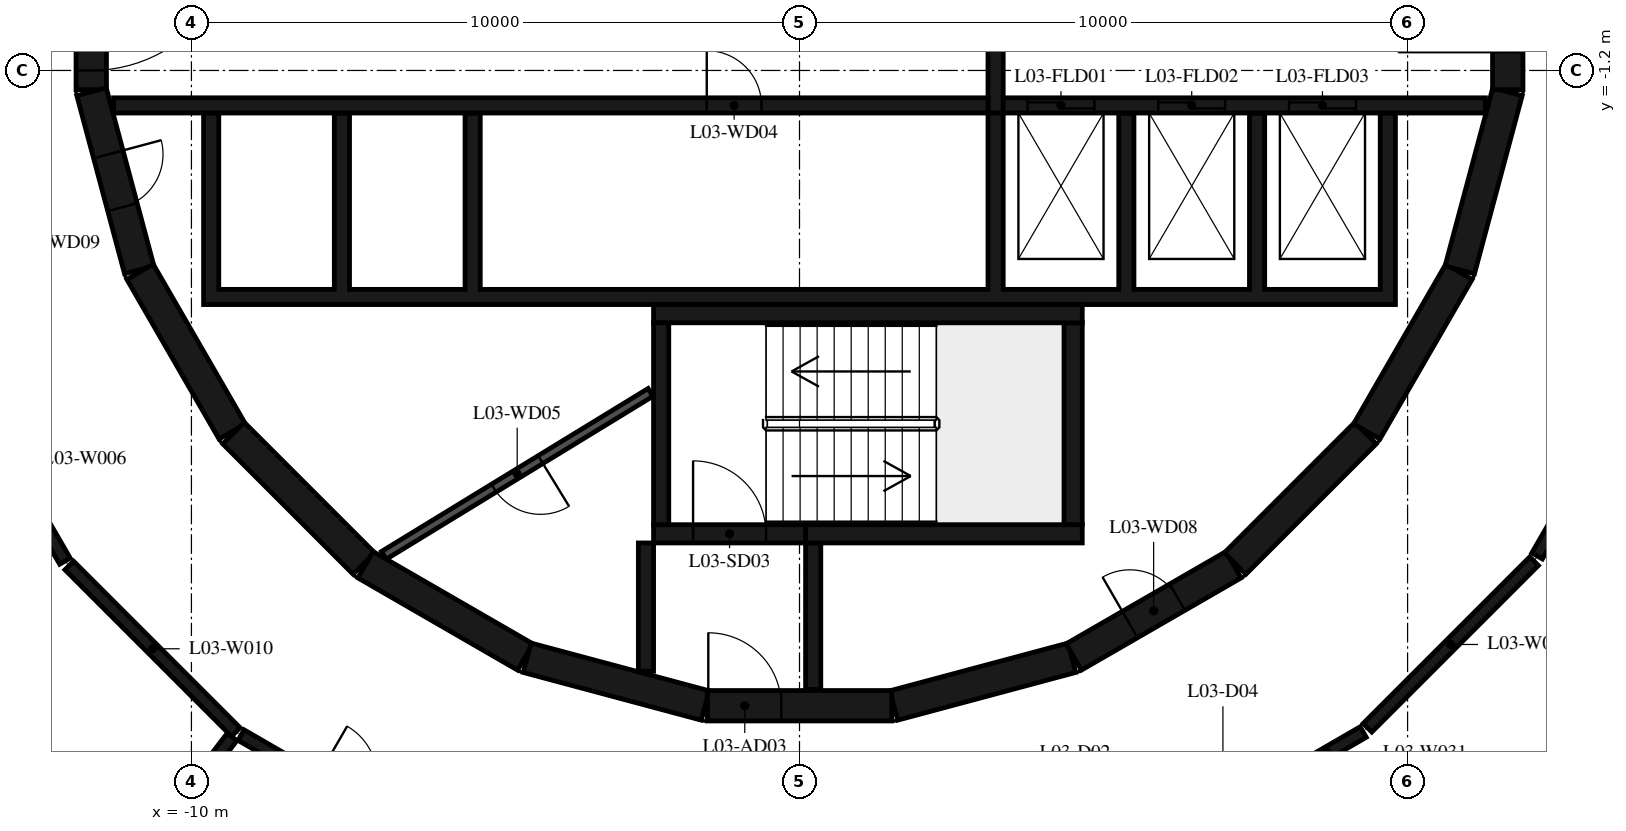
"""IFC4 building model, lengths in metres.
Left out: names, types, materials, properties, quantities, classifications, styles, units other than length and angle.
Written with IfcOpenShell. Run it as: python <this file> out.ifc"""

import sys

from ifc_helpers import new_model, si_unit, direction, frame, frame_2d, origin, place, context, subcontext, project, spatial, polyline, rectangle, outline, extrude, element, fill, save


model = new_model("IFC4")
c1 = context("Model", 3, precision=1e-05, world=origin(), true_north=direction((0.0, 1.0)))
c2 = subcontext(c1, "Body", "Model", "MODEL_VIEW")
j1 = project(units=[si_unit("LENGTHUNIT", "METRE"), si_unit("PLANEANGLEUNIT", "RADIAN")], contexts=[c1])
p1 = place(None, origin())
s1 = spatial("IfcSite", under=j1, at=p1, CompositionType="ELEMENT")
p2 = place(p1, origin())
s2 = spatial("IfcBuilding", under=s1, at=p2, CompositionType="ELEMENT")
p3 = place(p2, frame((0.0, 0.0, 18.6)))
s3 = spatial("IfcBuildingStorey", under=s2, at=p3, CompositionType="ELEMENT", Elevation=18.6)
p4 = place(p3, frame((1.55, -11.643, 0.0), z_axis=(0.0, 0.0, 1.0), x_axis=(0.965948410781, 0.258734743916, 0.0)))
e1 = element("IfcWall", 1, at=p4, inside=s3, PredefinedType="SHEAR", context=c2, shape_type="SweptSolid", body=[
    extrude(rectangle(XDim=3.033, YDim=0.5, at=frame_2d((1.516, 0.0))), origin(), (0.0, 0.0, 1.0), 4.42),
])
p5 = place(p3, frame((4.51, -10.845, 0.0), z_axis=(0.0, 0.0, 1.0), x_axis=(0.865975092491, 0.500087131594, 0.0)))
e2 = element("IfcWall", 2, at=p5, inside=s3, PredefinedType="SHEAR", context=c2, shape_type="SweptSolid", body=[
    extrude(rectangle(XDim=3.033, YDim=0.5, at=frame_2d((1.516, 0.0))), origin(), (0.0, 0.0, 1.0), 4.42),
])
p6 = place(p5, frame((1.066, 0.0, 0.0)))
e3 = element("IfcOpeningElement", 3, at=p6, cuts=e2, PredefinedType="OPENING", context=c2, shape_type="SweptSolid", body=[
    extrude(rectangle(XDim=0.9, YDim=2.1, at=frame_2d((0.45, 1.05))), frame((0.0, 0.26, 0.0), z_axis=(0.0, -1.0, 0.0), x_axis=(1.0, 0.0, 0.0)), (0.0, 0.0, 1.0), 0.52),
])
p7 = place(p3, frame((7.164, -9.308, 0.0), z_axis=(0.0, 0.0, 1.0), x_axis=(0.707106781187, 0.707106781187, 0.0)))
e4 = element("IfcWall", 4, at=p7, inside=s3, PredefinedType="SHEAR", context=c2, shape_type="SweptSolid", body=[
    extrude(rectangle(XDim=3.032, YDim=0.5, at=frame_2d((1.516, 0.0))), origin(), (0.0, 0.0, 1.0), 4.42),
])
for number, where, z_axis, x_axis in (
    (5, (9.329, -7.137, 0.0), (0.0, 0.0, 1.0), (0.5, 0.866, 0.0)),
    (6, (10.858, -4.479, 0.0), (0.0, 0.0, 1.0), (0.259, 0.966, 0.0)),
):
    element("IfcWall", number, at=place(p3, frame(where, z_axis=z_axis, x_axis=x_axis)), inside=s3, PredefinedType="SHEAR", context=c2, shape_type="SweptSolid", body=[
        extrude(rectangle(XDim=3.033, YDim=0.5, at=frame_2d((1.516, 0.0))), origin(), (0.0, 0.0, 1.0), 4.42),
    ])
p8 = place(p3, frame((11.647, -1.516, 0.0), z_axis=(0.0, 0.0, 1.0), x_axis=(0.0, 1.0, 0.0)))
e7 = element("IfcWall", 7, at=p8, inside=s3, PredefinedType="SHEAR", context=c2, shape_type="SweptSolid", body=[
    extrude(rectangle(XDim=3.033, YDim=0.5, at=frame_2d((1.516, 0.0))), origin(), (0.0, 0.0, 1.0), 4.42),
])
p9 = place(p8, frame((0.616, 0.0, 0.0)))
e8 = element("IfcOpeningElement", 8, at=p9, cuts=e7, PredefinedType="OPENING", context=c2, shape_type="SweptSolid", body=[
    extrude(rectangle(XDim=1.8, YDim=2.1, at=frame_2d((0.9, 1.05))), frame((0.0, 0.26, 0.0), z_axis=(0.0, -1.0, 0.0), x_axis=(1.0, 0.0, 0.0)), (0.0, 0.0, 1.0), 0.52),
])
p10 = place(p3, frame((-11.647, 1.516, 0.0), z_axis=(0.0, 0.0, 1.0), x_axis=(0.0, -1.0, 0.0)))
e9 = element("IfcWall", 9, at=p10, inside=s3, PredefinedType="SHEAR", context=c2, shape_type="SweptSolid", body=[
    extrude(rectangle(XDim=3.033, YDim=0.5, at=frame_2d((1.516, 0.0))), origin(), (0.0, 0.0, 1.0), 4.42),
])
p11 = place(p10, frame((0.316, 0.0, 0.0)))
e10 = element("IfcOpeningElement", 10, at=p11, cuts=e9, PredefinedType="OPENING", context=c2, shape_type="SweptSolid", body=[
    extrude(rectangle(XDim=2.4, YDim=2.1, at=frame_2d((1.2, 1.05))), frame((0.0, 0.26, 0.0), z_axis=(0.0, -1.0, 0.0), x_axis=(1.0, 0.0, 0.0)), (0.0, 0.0, 1.0), 0.52),
])
p12 = place(p3, frame((-11.643, -1.55, 0.0), z_axis=(0.0, 0.0, 1.0), x_axis=(0.258734743916, -0.965948410781, 0.0)))
e11 = element("IfcWall", 11, at=p12, inside=s3, PredefinedType="SHEAR", context=c2, shape_type="SweptSolid", body=[
    extrude(rectangle(XDim=3.033, YDim=0.5, at=frame_2d((1.516, 0.0))), origin(), (0.0, 0.0, 1.0), 4.42),
])
p13 = place(p12, frame((1.066, 0.0, 0.0)))
e12 = element("IfcOpeningElement", 12, at=p13, cuts=e11, PredefinedType="OPENING", context=c2, shape_type="SweptSolid", body=[
    extrude(rectangle(XDim=0.9, YDim=2.1, at=frame_2d((0.45, 1.05))), frame((0.0, 0.26, 0.0), z_axis=(0.0, -1.0, 0.0), x_axis=(1.0, 0.0, 0.0)), (0.0, 0.0, 1.0), 0.52),
])
p14 = place(p3, frame((-10.845, -4.51, 0.0), z_axis=(0.0, 0.0, 1.0), x_axis=(0.500087131594, -0.865975092491, 0.0)))
e13 = element("IfcWall", 13, at=p14, inside=s3, PredefinedType="SHEAR", context=c2, shape_type="SweptSolid", body=[
    extrude(rectangle(XDim=3.033, YDim=0.5, at=frame_2d((1.516, 0.0))), origin(), (0.0, 0.0, 1.0), 4.42),
])
p15 = place(p3, frame((-9.308, -7.164, 0.0), z_axis=(0.0, 0.0, 1.0), x_axis=(0.707106781187, -0.707106781187, 0.0)))
e14 = element("IfcWall", 14, at=p15, inside=s3, PredefinedType="SHEAR", context=c2, shape_type="SweptSolid", body=[
    extrude(rectangle(XDim=3.032, YDim=0.5, at=frame_2d((1.516, 0.0))), origin(), (0.0, 0.0, 1.0), 4.42),
])
for number, where, z_axis, x_axis in (
    (15, (-7.137, -9.329, 0.0), (0.0, 0.0, 1.0), (0.866, -0.5, 0.0)),
    (16, (-4.479, -10.858, 0.0), (0.0, 0.0, 1.0), (0.966, -0.259, 0.0)),
):
    element("IfcWall", number, at=place(p3, frame(where, z_axis=z_axis, x_axis=x_axis)), inside=s3, PredefinedType="SHEAR", context=c2, shape_type="SweptSolid", body=[
        extrude(rectangle(XDim=3.033, YDim=0.5, at=frame_2d((1.516, 0.0))), origin(), (0.0, 0.0, 1.0), 4.42),
    ])
p16 = place(p3, frame((-1.516, -11.647, 0.0), z_axis=(0.0, 0.0, 1.0), x_axis=(1.0, 0.0, 0.0)))
e17 = element("IfcWall", 17, at=p16, inside=s3, PredefinedType="SHEAR", context=c2, shape_type="SweptSolid", body=[
    extrude(rectangle(XDim=3.033, YDim=0.5, at=frame_2d((1.516, 0.0))), origin(), (0.0, 0.0, 1.0), 4.42),
])
p17 = place(p16, frame((0.016, 0.0, 0.0)))
e18 = element("IfcOpeningElement", 18, at=p17, cuts=e17, PredefinedType="OPENING", context=c2, shape_type="SweptSolid", body=[
    extrude(rectangle(XDim=1.2, YDim=2.1, at=frame_2d((0.6, 1.05))), frame((0.0, 0.26, 0.0), z_axis=(0.0, -1.0, 0.0), x_axis=(1.0, 0.0, 0.0)), (0.0, 0.0, 1.0), 0.52),
])
p18 = place(p3, frame((-2.275, -8.67, 0.0), z_axis=(0.0, 0.0, 1.0), x_axis=(0.0, 1.0, 0.0)))
e19 = element("IfcWall", 19, at=p18, inside=s3, PredefinedType="SHEAR", context=c2, shape_type="SweptSolid", body=[
    extrude(rectangle(XDim=3.32, YDim=0.25, at=frame_2d((1.66, 0.0))), origin(), (0.0, 0.0, 1.0), 4.42),
])
p19 = place(p3, frame((-2.4, -5.2, 0.0), z_axis=(0.0, 0.0, 1.0), x_axis=(1.0, 0.0, 0.0)))
e20 = element("IfcWall", 20, at=p19, inside=s3, PredefinedType="SHEAR", context=c2, shape_type="SweptSolid", body=[
    extrude(rectangle(XDim=7.05, YDim=0.3, at=frame_2d((3.525, 0.0))), origin(), (0.0, 0.0, 1.0), 4.42),
])
p20 = place(p3, frame((4.5, -8.67, 0.0), z_axis=(0.0, 0.0, 1.0), x_axis=(0.0, 1.0, 0.0)))
e21 = element("IfcWall", 21, at=p20, inside=s3, PredefinedType="SHEAR", context=c2, shape_type="SweptSolid", body=[
    extrude(rectangle(XDim=3.32, YDim=0.3, at=frame_2d((1.66, 0.0))), origin(), (0.0, 0.0, 1.0), 4.42),
])
p21 = place(p3, frame((0.1, -8.82, 0.0), z_axis=(0.0, 0.0, 1.0), x_axis=(1.0, 0.0, 0.0)))
e22 = element("IfcWall", 22, at=p21, inside=s3, PredefinedType="SHEAR", context=c2, shape_type="SweptSolid", body=[
    extrude(rectangle(XDim=4.55, YDim=0.3, at=frame_2d((2.275, 0.0))), origin(), (0.0, 0.0, 1.0), 4.42),
])
p22 = place(p3, frame((-2.4, -8.82, 0.0), z_axis=(0.0, 0.0, 1.0), x_axis=(1.0, 0.0, 0.0)))
e23 = element("IfcWall", 23, at=p22, inside=s3, PredefinedType="SHEAR", context=c2, shape_type="SweptSolid", body=[
    extrude(rectangle(XDim=2.5, YDim=0.3, at=frame_2d((1.25, 0.0))), origin(), (0.0, 0.0, 1.0), 4.42),
])
p23 = place(p22, frame((0.65, 0.0, 0.0)))
e24 = element("IfcOpeningElement", 24, at=p23, cuts=e23, PredefinedType="OPENING", context=c2, shape_type="SweptSolid", body=[
    extrude(rectangle(XDim=1.2, YDim=2.1, at=frame_2d((0.6, 1.05))), frame((0.0, 0.16, 0.0), z_axis=(0.0, -1.0, 0.0), x_axis=(1.0, 0.0, 0.0)), (0.0, 0.0, 1.0), 0.32),
])
p24 = place(p3, frame((-2.525, -8.97, 0.0), z_axis=(0.0, 0.0, 1.0), x_axis=(0.0, -1.0, 0.0)))
e25 = element("IfcWall", 25, at=p24, inside=s3, PredefinedType="SHEAR", context=c2, shape_type="SweptSolid", body=[
    extrude(rectangle(XDim=2.11, YDim=0.25, at=frame_2d((1.055, 0.0))), origin(), (0.0, 0.0, 1.0), 4.42),
])
p25 = place(p3, frame((0.225, -8.97, 0.0), z_axis=(0.0, 0.0, 1.0), x_axis=(0.0, -1.0, 0.0)))
e26 = element("IfcWall", 26, at=p25, inside=s3, PredefinedType="SHEAR", context=c2, shape_type="SweptSolid", body=[
    extrude(rectangle(XDim=2.41, YDim=0.25, at=frame_2d((1.205, 0.0))), origin(), (0.0, 0.0, 1.0), 4.42),
])
p26 = place(p3, origin())
e27 = element("IfcWall", 27, at=p26, inside=s3, PredefinedType="SHEAR", context=c2, shape_type="SweptSolid", body=[
    extrude(outline(polyline([(9.8, -5.05), (9.8, -4.8), (9.8, -1.9), (9.55, -1.9), (9.55, -4.8), (7.65, -4.8), (7.65, -1.9), (7.4, -1.9), (7.4, -4.8), (5.5, -4.8), (5.5, -1.9), (5.25, -1.9), (5.25, -4.8), (3.35, -4.8), (3.35, -1.9), (3.1, -1.9), (3.1, -4.8), (-5.25, -4.8), (-5.25, -1.9), (-5.5, -1.9), (-5.5, -4.8), (-7.4, -4.8), (-7.4, -1.9), (-7.65, -1.9), (-7.65, -4.8), (-9.55, -4.8), (-9.55, -1.9), (-9.8, -1.9), (-9.8, -4.8), (-9.8, -5.05), (9.8, -5.05)])), origin(), (0.0, 0.0, 1.0), 4.42),
])
p27 = place(p3, frame((-11.28, -1.775, 0.0), z_axis=(0.0, 0.0, 1.0), x_axis=(1.0, 0.0, 0.0)))
e28 = element("IfcWall", 28, at=p27, inside=s3, PredefinedType="SHEAR", context=c2, shape_type="SweptSolid", body=[
    extrude(rectangle(XDim=14.38, YDim=0.25, at=frame_2d((7.19, 0.0))), origin(), (0.0, 0.0, 1.0), 4.42),
])
p28 = place(p27, frame((9.755, 0.0, 0.0)))
e29 = element("IfcOpeningElement", 29, at=p28, cuts=e28, PredefinedType="OPENING", context=c2, shape_type="SweptSolid", body=[
    extrude(rectangle(XDim=0.9, YDim=2.1, at=frame_2d((0.45, 1.05))), frame((0.0, 0.135, 0.0), z_axis=(0.0, -1.0, 0.0), x_axis=(1.0, 0.0, 0.0)), (0.0, 0.0, 1.0), 0.27),
])
p29 = place(p3, frame((3.35, -1.775, 0.0), z_axis=(0.0, 0.0, 1.0), x_axis=(1.0, 0.0, 0.0)))
e30 = element("IfcWall", 30, at=p29, inside=s3, PredefinedType="SHEAR", context=c2, shape_type="SweptSolid", body=[
    extrude(rectangle(XDim=7.93, YDim=0.25, at=frame_2d((3.965, 0.0))), origin(), (0.0, 0.0, 1.0), 4.42),
])
p30 = place(p29, frame((0.4, 0.0, 0.0)))
e31 = element("IfcOpeningElement", 31, at=p30, cuts=e30, PredefinedType="OPENING", context=c2, shape_type="SweptSolid", body=[
    extrude(rectangle(XDim=1.1, YDim=2.4, at=frame_2d((0.55, 1.2))), frame((0.0, 0.135, 0.0), z_axis=(0.0, -1.0, 0.0), x_axis=(1.0, 0.0, 0.0)), (0.0, 0.0, 1.0), 0.27),
])
p31 = place(p29, frame((2.55, 0.0, 0.0)))
e32 = element("IfcOpeningElement", 32, at=p31, cuts=e30, PredefinedType="OPENING", context=c2, shape_type="SweptSolid", body=[
    extrude(rectangle(XDim=1.1, YDim=2.4, at=frame_2d((0.55, 1.2))), frame((0.0, 0.135, 0.0), z_axis=(0.0, -1.0, 0.0), x_axis=(1.0, 0.0, 0.0)), (0.0, 0.0, 1.0), 0.27),
])
p32 = place(p29, frame((4.7, 0.0, 0.0)))
e33 = element("IfcOpeningElement", 33, at=p32, cuts=e30, PredefinedType="OPENING", context=c2, shape_type="SweptSolid", body=[
    extrude(rectangle(XDim=1.1, YDim=2.4, at=frame_2d((0.55, 1.2))), frame((0.0, 0.135, 0.0), z_axis=(0.0, -1.0, 0.0), x_axis=(1.0, 0.0, 0.0)), (0.0, 0.0, 1.0), 0.27),
])
p33 = place(p3, frame((3.225, -1.9, 0.0), z_axis=(0.0, 0.0, 1.0), x_axis=(0.0, 1.0, 0.0)))
e34 = element("IfcWall", 34, at=p33, inside=s3, PredefinedType="SHEAR", context=c2, shape_type="SweptSolid", body=[
    extrude(rectangle(XDim=3.8, YDim=0.25, at=frame_2d((1.9, 0.0))), origin(), (0.0, 0.0, 1.0), 4.42),
])
p34 = place(p3, frame((-2.451, -6.495, 0.0), z_axis=(0.0, 0.0, 1.0), x_axis=(-0.853250115418, -0.521501908471, 0.0)))
e35 = element("IfcWall", 35, at=p34, inside=s3, PredefinedType="PARTITIONING", context=c2, shape_type="SweptSolid", body=[
    extrude(rectangle(XDim=5.137, YDim=0.15, at=frame_2d((2.569, 0.0))), origin(), (0.0, 0.0, 1.0), 4.42),
])
p35 = place(p34, frame((2.119, 0.0, 0.0)))
e36 = element("IfcOpeningElement", 36, at=p35, cuts=e35, PredefinedType="OPENING", context=c2, shape_type="SweptSolid", body=[
    extrude(rectangle(XDim=0.9, YDim=2.1, at=frame_2d((0.45, 1.05))), frame((0.0, 0.085, 0.0), z_axis=(0.0, -1.0, 0.0), x_axis=(1.0, 0.0, 0.0)), (0.0, 0.0, 1.0), 0.17),
])
p36 = place(p3, frame((-14.02, -5.917, 0.0), z_axis=(0.0, 0.0, 1.0), x_axis=(0.500733182901, -0.865601686425, 0.0)))
e37 = element("IfcWall", 37, at=p36, inside=s3, PredefinedType="PARTITIONING", context=c2, shape_type="SweptSolid", body=[
    extrude(rectangle(XDim=3.874, YDim=0.2, at=frame_2d((1.937, 0.0))), origin(), (0.0, 0.0, 1.0), 4.42),
])
p37 = place(p3, frame((-12.009, -9.341, 0.0), z_axis=(0.0, 0.0, 1.0), x_axis=(0.707106781187, -0.707106781187, 0.0)))
e38 = element("IfcWall", 38, at=p37, inside=s3, PredefinedType="PARTITIONING", context=c2, shape_type="SweptSolid", body=[
    extrude(rectangle(XDim=3.874, YDim=0.2, at=frame_2d((1.937, 0.0))), origin(), (0.0, 0.0, 1.0), 4.42),
])
p38 = place(p3, frame((-9.331, -12.159, 0.0), z_axis=(0.0, 0.0, 1.0), x_axis=(-0.608558385637, -0.793509099677, 0.0)))
e39 = element("IfcWall", 39, at=p38, inside=s3, PredefinedType="PARTITIONING", context=c2, shape_type="SweptSolid", body=[
    extrude(rectangle(XDim=9.415, YDim=0.2, at=frame_2d((4.707, 0.0))), origin(), (0.0, 0.0, 1.0), 4.42),
])
p39 = place(p3, frame((-9.183, -12.13, 0.0), z_axis=(0.0, 0.0, 1.0), x_axis=(0.865585884642, -0.500760497952, 0.0)))
e40 = element("IfcWall", 40, at=p39, inside=s3, PredefinedType="PARTITIONING", context=c2, shape_type="SweptSolid", body=[
    extrude(rectangle(XDim=3.874, YDim=0.2, at=frame_2d((1.937, 0.0))), origin(), (0.0, 0.0, 1.0), 4.42),
])
p40 = place(p39, frame((1.437, 0.0, 0.0)))
e41 = element("IfcOpeningElement", 41, at=p40, cuts=e40, PredefinedType="OPENING", context=c2, shape_type="SweptSolid", body=[
    extrude(rectangle(XDim=1.0, YDim=2.1, at=frame_2d((0.5, 1.05))), frame((0.0, 0.11, 0.0), z_axis=(0.0, -1.0, 0.0), x_axis=(1.0, 0.0, 0.0)), (0.0, 0.0, 1.0), 0.22),
])
p41 = place(p3, frame((8.096, -12.76, 0.0), z_axis=(0.0, 0.0, 1.0), x_axis=(0.865348217229, 0.501171091484, 0.0)))
e42 = element("IfcWall", 42, at=p41, inside=s3, PredefinedType="PARTITIONING", context=c2, shape_type="SweptSolid", body=[
    extrude(rectangle(XDim=1.356, YDim=0.2, at=frame_2d((0.678, 0.0))), origin(), (0.0, 0.0, 1.0), 4.42),
])
p42 = place(p3, frame((9.341, -12.009, 0.0), z_axis=(0.0, 0.0, 1.0), x_axis=(0.707106781187, 0.707106781187, 0.0)))
e43 = element("IfcWall", 43, at=p42, inside=s3, PredefinedType="PARTITIONING", context=c2, shape_type="SweptSolid", body=[
    extrude(rectangle(XDim=3.874, YDim=0.2, at=frame_2d((1.937, 0.0))), origin(), (0.0, 0.0, 1.0), 4.42),
])
p43 = place(p3, frame((12.13, -9.183, 0.0), z_axis=(0.0, 0.0, 1.0), x_axis=(0.500760497952, 0.865585884642, 0.0)))
e44 = element("IfcWall", 44, at=p43, inside=s3, PredefinedType="PARTITIONING", context=c2, shape_type="SweptSolid", body=[
    extrude(rectangle(XDim=3.874, YDim=0.2, at=frame_2d((1.937, 0.0))), origin(), (0.0, 0.0, 1.0), 4.42),
])
p44 = place(p23, origin())
e45 = element("IfcDoor", 45, at=p44, inside=s3, OperationType="SINGLE_SWING_LEFT", PredefinedType="DOOR", context=c2, shape_type="SweptSolid", body=[
    extrude(rectangle(XDim=1.2, YDim=2.1, at=frame_2d((0.6, 1.05))), frame((0.0, 0.025, 0.0), z_axis=(0.0, -1.0, 0.0), x_axis=(1.0, 0.0, 0.0)), (0.0, 0.0, 1.0), 0.05),
])
fill(e24, e45)
p45 = place(p17, origin())
e46 = element("IfcDoor", 46, at=p45, inside=s3, OperationType="SINGLE_SWING_RIGHT", PredefinedType="DOOR", context=c2, shape_type="SweptSolid", body=[
    extrude(rectangle(XDim=1.2, YDim=2.1, at=frame_2d((0.6, 1.05))), frame((0.0, 0.025, 0.0), z_axis=(0.0, -1.0, 0.0), x_axis=(1.0, 0.0, 0.0)), (0.0, 0.0, 1.0), 0.05),
])
fill(e18, e46)
p46 = place(p11, origin())
e47 = element("IfcDoor", 47, at=p46, inside=s3, OperationType="DOUBLE_DOOR_SINGLE_SWING", PredefinedType="DOOR", context=c2, shape_type="SweptSolid", body=[
    extrude(rectangle(XDim=2.4, YDim=2.1, at=frame_2d((1.2, 1.05))), frame((0.0, 0.025, 0.0), z_axis=(0.0, -1.0, 0.0), x_axis=(1.0, 0.0, 0.0)), (0.0, 0.0, 1.0), 0.05),
])
fill(e10, e47)
p47 = place(p9, origin())
e48 = element("IfcDoor", 48, at=p47, inside=s3, OperationType="DOUBLE_DOOR_SINGLE_SWING", PredefinedType="DOOR", context=c2, shape_type="SweptSolid", body=[
    extrude(rectangle(XDim=1.8, YDim=2.1, at=frame_2d((0.9, 1.05))), frame((0.0, 0.025, 0.0), z_axis=(0.0, -1.0, 0.0), x_axis=(1.0, 0.0, 0.0)), (0.0, 0.0, 1.0), 0.05),
])
fill(e8, e48)
p48 = place(p30, origin())
e49 = element("IfcDoor", 49, at=p48, inside=s3, OperationType="DOUBLE_DOOR_SLIDING", PredefinedType="DOOR", context=c2, shape_type="SweptSolid", body=[
    extrude(rectangle(XDim=1.1, YDim=2.4, at=frame_2d((0.55, 1.2))), frame((0.0, 0.025, 0.0), z_axis=(0.0, -1.0, 0.0), x_axis=(1.0, 0.0, 0.0)), (0.0, 0.0, 1.0), 0.05),
])
fill(e31, e49)
p49 = place(p31, origin())
e50 = element("IfcDoor", 50, at=p49, inside=s3, OperationType="DOUBLE_DOOR_SLIDING", PredefinedType="DOOR", context=c2, shape_type="SweptSolid", body=[
    extrude(rectangle(XDim=1.1, YDim=2.4, at=frame_2d((0.55, 1.2))), frame((0.0, 0.025, 0.0), z_axis=(0.0, -1.0, 0.0), x_axis=(1.0, 0.0, 0.0)), (0.0, 0.0, 1.0), 0.05),
])
fill(e32, e50)
p50 = place(p32, origin())
e51 = element("IfcDoor", 51, at=p50, inside=s3, OperationType="DOUBLE_DOOR_SLIDING", PredefinedType="DOOR", context=c2, shape_type="SweptSolid", body=[
    extrude(rectangle(XDim=1.1, YDim=2.4, at=frame_2d((0.55, 1.2))), frame((0.0, 0.025, 0.0), z_axis=(0.0, -1.0, 0.0), x_axis=(1.0, 0.0, 0.0)), (0.0, 0.0, 1.0), 0.05),
])
fill(e33, e51)
p51 = place(p28, origin())
e52 = element("IfcDoor", 52, at=p51, inside=s3, OperationType="SINGLE_SWING_LEFT", PredefinedType="DOOR", context=c2, shape_type="SweptSolid", body=[
    extrude(rectangle(XDim=0.9, YDim=2.1, at=frame_2d((0.45, 1.05))), frame((0.0, 0.025, 0.0), z_axis=(0.0, -1.0, 0.0), x_axis=(1.0, 0.0, 0.0)), (0.0, 0.0, 1.0), 0.05),
])
fill(e29, e52)
p52 = place(p35, origin())
e53 = element("IfcDoor", 53, at=p52, inside=s3, OperationType="SINGLE_SWING_RIGHT", PredefinedType="DOOR", context=c2, shape_type="SweptSolid", body=[
    extrude(rectangle(XDim=0.9, YDim=2.1, at=frame_2d((0.45, 1.05))), frame((0.0, 0.025, 0.0), z_axis=(0.0, -1.0, 0.0), x_axis=(1.0, 0.0, 0.0)), (0.0, 0.0, 1.0), 0.05),
])
fill(e36, e53)
p53 = place(p6, origin())
e54 = element("IfcDoor", 54, at=p53, inside=s3, OperationType="SINGLE_SWING_LEFT", PredefinedType="DOOR", context=c2, shape_type="SweptSolid", body=[
    extrude(rectangle(XDim=0.9, YDim=2.1, at=frame_2d((0.45, 1.05))), frame((0.0, 0.025, 0.0), z_axis=(0.0, -1.0, 0.0), x_axis=(1.0, 0.0, 0.0)), (0.0, 0.0, 1.0), 0.05),
])
fill(e3, e54)
p54 = place(p13, origin())
e55 = element("IfcDoor", 55, at=p54, inside=s3, OperationType="SINGLE_SWING_RIGHT", PredefinedType="DOOR", context=c2, shape_type="SweptSolid", body=[
    extrude(rectangle(XDim=0.9, YDim=2.1, at=frame_2d((0.45, 1.05))), frame((0.0, 0.025, 0.0), z_axis=(0.0, -1.0, 0.0), x_axis=(1.0, 0.0, 0.0)), (0.0, 0.0, 1.0), 0.05),
])
fill(e12, e55)
save(model, sys.argv[1])
